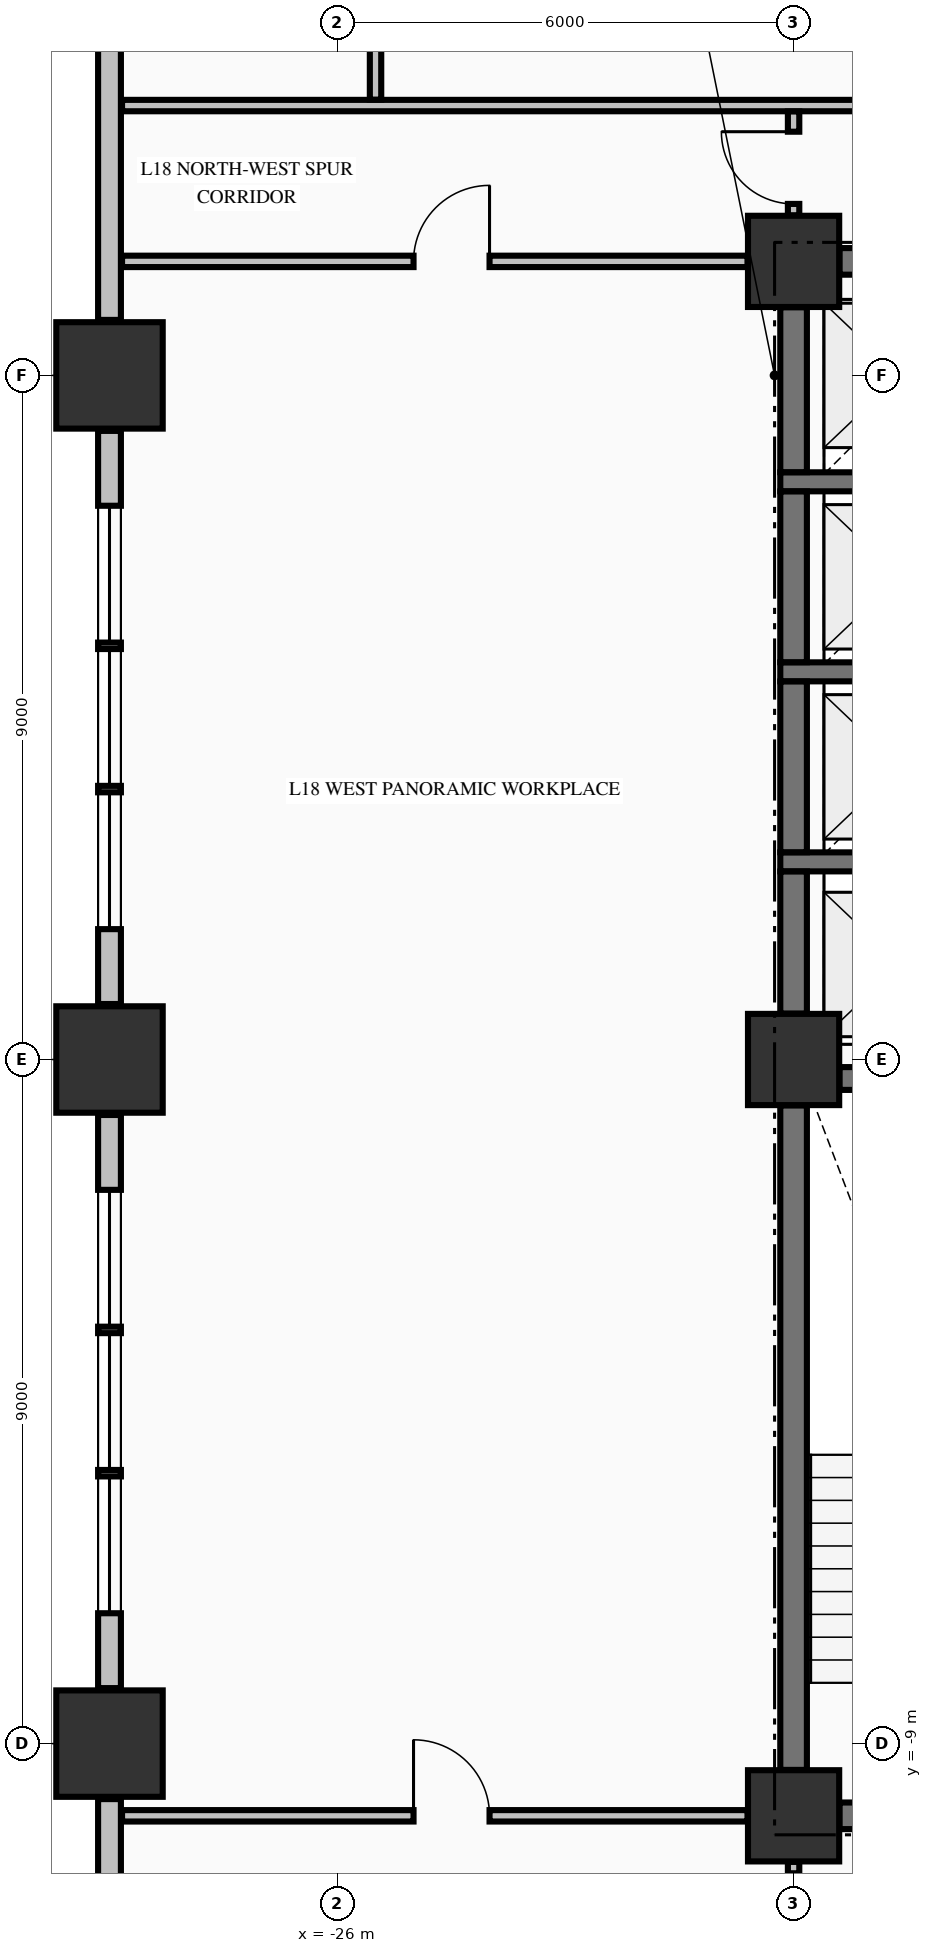
"""IFC4 building model, lengths in metres.
Left out: names, types, materials, properties, quantities, classifications, styles, units other than length and angle.
Written with IfcOpenShell. Run it as: python <this file> out.ifc"""

import sys

from ifc_helpers import new_model, si_unit, direction, frame, frame_2d, origin, origin_2d, place, context, subcontext, project, spatial, rectangle, extrude, element, fill, save


model = new_model("IFC4")
c1 = context("Model", 3, precision=1e-05, world=origin(), true_north=direction((0.0, 1.0)))
c2 = subcontext(c1, "Body", "Model", "MODEL_VIEW")
j1 = project(units=[si_unit("LENGTHUNIT", "METRE"), si_unit("PLANEANGLEUNIT", "RADIAN")], contexts=[c1])
p1 = place(None, origin())
s1 = spatial("IfcSite", under=j1, at=p1, CompositionType="ELEMENT")
p2 = place(p1, origin())
s2 = spatial("IfcBuilding", under=s1, at=p2, CompositionType="ELEMENT")
p3 = place(p2, frame((0.0, 0.0, 75.04)))
s3 = spatial("IfcBuildingStorey", under=s2, at=p3, CompositionType="ELEMENT", Elevation=75.04)
for number, where, z_axis, x_axis in (
    (1, (-29.0, -9.0, -0.25), (0.0, 0.0, 1.0), (1.0, 0.0, 0.0)),
    (2, (-29.0, 0.0, -0.25), (0.0, 0.0, 1.0), (1.0, 0.0, 0.0)),
    (3, (-29.0, 9.0, -0.25), (0.0, 0.0, 1.0), (1.0, 0.0, 0.0)),
):
    element("IfcColumn", number, at=place(p3, frame(where, z_axis=z_axis, x_axis=x_axis)), inside=s3, PredefinedType="COLUMN", context=c2, shape_type="SweptSolid", body=[
        extrude(rectangle(XDim=1.4, YDim=1.4, at=origin_2d()), origin(), (0.0, 0.0, 1.0), 3.57),
    ])
for number, where, z_axis, x_axis in (
    (4, (-20.0, -9.95, -0.25), (0.0, 0.0, 1.0), (1.0, 0.0, 0.0)),
    (5, (-20.0, 10.5, -0.25), (0.0, 0.0, 1.0), (1.0, 0.0, 0.0)),
    (6, (-20.0, 0.0, -0.25), (0.0, 0.0, 1.0), (1.0, 0.0, 0.0)),
):
    element("IfcColumn", number, at=place(p3, frame(where, z_axis=z_axis, x_axis=x_axis)), inside=s3, PredefinedType="COLUMN", context=c2, shape_type="SweptSolid", body=[
        extrude(rectangle(XDim=1.2, YDim=1.2, at=origin_2d()), origin(), (0.0, 0.0, 1.0), 3.57),
    ])
p4 = place(p3, frame((-29.0, -9.73, 0.0), z_axis=(0.0, 0.0, 1.0), x_axis=(0.0, -1.0, 0.0)))
e7 = element("IfcWall", 7, at=p4, inside=s3, PredefinedType="STANDARD", context=c2, shape_type="SweptSolid", body=[
    extrude(rectangle(XDim=12.54, YDim=0.3, at=frame_2d((6.27, 0.0))), origin(), (0.0, 0.0, 1.0), 2.712),
])
p5 = place(p3, frame((-29.0, -0.73, 0.0), z_axis=(0.0, 0.0, 1.0), x_axis=(0.0, -1.0, 0.0)))
e8 = element("IfcWall", 8, at=p5, inside=s3, PredefinedType="STANDARD", context=c2, shape_type="SweptSolid", body=[
    extrude(rectangle(XDim=7.54, YDim=0.3, at=frame_2d((3.77, 0.0))), origin(), (0.0, 0.0, 1.0), 2.712),
])
p6 = place(p5, frame((0.985, 0.0, 0.78)))
e9 = element("IfcOpeningElement", 9, at=p6, cuts=e8, PredefinedType="OPENING", context=c2, shape_type="SweptSolid", body=[
    extrude(rectangle(XDim=1.8, YDim=1.72, at=frame_2d((0.9, 0.86))), frame((0.0, 0.16, 0.0), z_axis=(0.0, -1.0, 0.0), x_axis=(1.0, 0.0, 0.0)), (0.0, 0.0, 1.0), 0.32),
])
p7 = place(p5, frame((2.87, 0.0, 0.78)))
e10 = element("IfcOpeningElement", 10, at=p7, cuts=e8, PredefinedType="OPENING", context=c2, shape_type="SweptSolid", body=[
    extrude(rectangle(XDim=1.8, YDim=1.72, at=frame_2d((0.9, 0.86))), frame((0.0, 0.16, 0.0), z_axis=(0.0, -1.0, 0.0), x_axis=(1.0, 0.0, 0.0)), (0.0, 0.0, 1.0), 0.32),
])
p8 = place(p5, frame((4.755, 0.0, 0.78)))
e11 = element("IfcOpeningElement", 11, at=p8, cuts=e8, PredefinedType="OPENING", context=c2, shape_type="SweptSolid", body=[
    extrude(rectangle(XDim=1.8, YDim=1.72, at=frame_2d((0.9, 0.86))), frame((0.0, 0.16, 0.0), z_axis=(0.0, -1.0, 0.0), x_axis=(1.0, 0.0, 0.0)), (0.0, 0.0, 1.0), 0.32),
])
p9 = place(p3, frame((-29.0, 8.27, 0.0), z_axis=(0.0, 0.0, 1.0), x_axis=(0.0, -1.0, 0.0)))
e12 = element("IfcWall", 12, at=p9, inside=s3, PredefinedType="STANDARD", context=c2, shape_type="SweptSolid", body=[
    extrude(rectangle(XDim=7.54, YDim=0.3, at=frame_2d((3.77, 0.0))), origin(), (0.0, 0.0, 1.0), 2.712),
])
p10 = place(p9, frame((0.985, 0.0, 0.78)))
e13 = element("IfcOpeningElement", 13, at=p10, cuts=e12, PredefinedType="OPENING", context=c2, shape_type="SweptSolid", body=[
    extrude(rectangle(XDim=1.8, YDim=1.72, at=frame_2d((0.9, 0.86))), frame((0.0, 0.16, 0.0), z_axis=(0.0, -1.0, 0.0), x_axis=(1.0, 0.0, 0.0)), (0.0, 0.0, 1.0), 0.32),
])
p11 = place(p9, frame((2.87, 0.0, 0.78)))
e14 = element("IfcOpeningElement", 14, at=p11, cuts=e12, PredefinedType="OPENING", context=c2, shape_type="SweptSolid", body=[
    extrude(rectangle(XDim=1.8, YDim=1.72, at=frame_2d((0.9, 0.86))), frame((0.0, 0.16, 0.0), z_axis=(0.0, -1.0, 0.0), x_axis=(1.0, 0.0, 0.0)), (0.0, 0.0, 1.0), 0.32),
])
p12 = place(p9, frame((4.755, 0.0, 0.78)))
e15 = element("IfcOpeningElement", 15, at=p12, cuts=e12, PredefinedType="OPENING", context=c2, shape_type="SweptSolid", body=[
    extrude(rectangle(XDim=1.8, YDim=1.72, at=frame_2d((0.9, 0.86))), frame((0.0, 0.16, 0.0), z_axis=(0.0, -1.0, 0.0), x_axis=(1.0, 0.0, 0.0)), (0.0, 0.0, 1.0), 0.32),
])
p13 = place(p3, frame((-29.0, 22.27, 0.0), z_axis=(0.0, 0.0, 1.0), x_axis=(0.0, -1.0, 0.0)))
e16 = element("IfcWall", 16, at=p13, inside=s3, PredefinedType="STANDARD", context=c2, shape_type="SweptSolid", body=[
    extrude(rectangle(XDim=12.54, YDim=0.3, at=frame_2d((6.27, 0.0))), origin(), (0.0, 0.0, 1.0), 2.712),
])
p14 = place(p3, frame((-19.396, -9.95, 0.0), z_axis=(0.0, 0.0, 1.0), x_axis=(1.0, 0.0, 0.0)))
e17 = element("IfcWall", 17, at=p14, inside=s3, PredefinedType="SHEAR", context=c2, shape_type="SweptSolid", body=[
    extrude(rectangle(XDim=4.696, YDim=0.35, at=frame_2d((2.348, 0.0))), origin(), (0.0, 0.0, 1.0), 3.32),
])
p15 = place(p14, frame((0.571, 0.0, 0.0)))
e18 = element("IfcOpeningElement", 18, at=p15, cuts=e17, PredefinedType="OPENING", context=c2, shape_type="SweptSolid", body=[
    extrude(rectangle(XDim=1.05, YDim=2.15, at=frame_2d((0.525, 1.075))), frame((0.0, 0.185, 0.0), z_axis=(0.0, -1.0, 0.0), x_axis=(1.0, 0.0, 0.0)), (0.0, 0.0, 1.0), 0.37),
])
p16 = place(p3, frame((-19.396, -0.25, 0.0), z_axis=(0.0, 0.0, 1.0), x_axis=(1.0, 0.0, 0.0)))
e19 = element("IfcWall", 19, at=p16, inside=s3, PredefinedType="SHEAR", context=c2, shape_type="SweptSolid", body=[
    extrude(rectangle(XDim=7.792, YDim=0.3, at=frame_2d((3.896, 0.0))), origin(), (0.0, 0.0, 1.0), 3.32),
])
p17 = place(p16, frame((5.696, 0.0, 0.0)))
e20 = element("IfcOpeningElement", 20, at=p17, cuts=e19, PredefinedType="OPENING", context=c2, shape_type="SweptSolid", body=[
    extrude(rectangle(XDim=1.1, YDim=2.15, at=frame_2d((0.55, 1.075))), frame((0.0, 0.16, 0.0), z_axis=(0.0, -1.0, 0.0), x_axis=(1.0, 0.0, 0.0)), (0.0, 0.0, 1.0), 0.32),
])
for number, where, z_axis, x_axis in (
    (21, (-20.175, 2.6, 0.0), (0.0, 0.0, 1.0), (1.0, 0.0, 0.0)),
    (22, (-20.175, 5.1, 0.0), (0.0, 0.0, 1.0), (1.0, 0.0, 0.0)),
    (23, (-20.175, 7.6, 0.0), (0.0, 0.0, 1.0), (1.0, 0.0, 0.0)),
):
    element("IfcWall", number, at=place(p3, frame(where, z_axis=z_axis, x_axis=x_axis)), inside=s3, PredefinedType="SOLIDWALL", context=c2, shape_type="SweptSolid", body=[
        extrude(rectangle(XDim=3.1, YDim=0.25, at=frame_2d((1.55, 0.0))), origin(), (0.0, 0.0, 1.0), 3.32),
    ])
p18 = place(p3, frame((-19.396, 10.5, 0.0), z_axis=(0.0, 0.0, 1.0), x_axis=(1.0, 0.0, 0.0)))
e24 = element("IfcWall", 24, at=p18, inside=s3, PredefinedType="SHEAR", context=c2, shape_type="SweptSolid", body=[
    extrude(rectangle(XDim=4.696, YDim=0.35, at=frame_2d((2.348, 0.0))), origin(), (0.0, 0.0, 1.0), 3.32),
])
p19 = place(p18, frame((2.796, 0.0, 0.0)))
e25 = element("IfcOpeningElement", 25, at=p19, cuts=e24, PredefinedType="OPENING", context=c2, shape_type="SweptSolid", body=[
    extrude(rectangle(XDim=1.2, YDim=2.15, at=frame_2d((0.6, 1.075))), frame((0.0, 0.185, 0.0), z_axis=(0.0, -1.0, 0.0), x_axis=(1.0, 0.0, 0.0)), (0.0, 0.0, 1.0), 0.37),
])
p20 = place(p3, frame((-28.835, -9.95, 0.0), z_axis=(0.0, 0.0, 1.0), x_axis=(1.0, 0.0, 0.0)))
e26 = element("IfcWall", 26, at=p20, inside=s3, PredefinedType="PARTITIONING", context=c2, shape_type="SweptSolid", body=[
    extrude(rectangle(XDim=8.229, YDim=0.15, at=frame_2d((4.115, 0.0))), origin(), (0.0, 0.0, 1.0), 3.32),
])
p21 = place(p20, frame((3.835, 0.0, 0.0)))
e27 = element("IfcOpeningElement", 27, at=p21, cuts=e26, PredefinedType="OPENING", context=c2, shape_type="SweptSolid", body=[
    extrude(rectangle(XDim=1.0, YDim=2.15, at=frame_2d((0.5, 1.075))), frame((0.0, 0.085, 0.0), z_axis=(0.0, -1.0, 0.0), x_axis=(1.0, 0.0, 0.0)), (0.0, 0.0, 1.0), 0.17),
])
p22 = place(p3, frame((-28.835, 10.5, 0.0), z_axis=(0.0, 0.0, 1.0), x_axis=(1.0, 0.0, 0.0)))
e28 = element("IfcWall", 28, at=p22, inside=s3, PredefinedType="PARTITIONING", context=c2, shape_type="SweptSolid", body=[
    extrude(rectangle(XDim=8.229, YDim=0.15, at=frame_2d((4.115, 0.0))), origin(), (0.0, 0.0, 1.0), 3.32),
])
p23 = place(p22, frame((3.835, 0.0, 0.0)))
e29 = element("IfcOpeningElement", 29, at=p23, cuts=e28, PredefinedType="OPENING", context=c2, shape_type="SweptSolid", body=[
    extrude(rectangle(XDim=1.0, YDim=2.15, at=frame_2d((0.5, 1.075))), frame((0.0, 0.085, 0.0), z_axis=(0.0, -1.0, 0.0), x_axis=(1.0, 0.0, 0.0)), (0.0, 0.0, 1.0), 0.17),
])
p24 = place(p3, frame((-28.835, 12.55, 0.0), z_axis=(0.0, 0.0, 1.0), x_axis=(1.0, 0.0, 0.0)))
e30 = element("IfcWall", 30, at=p24, inside=s3, PredefinedType="PARTITIONING", context=c2, shape_type="SweptSolid", body=[
    extrude(rectangle(XDim=52.67, YDim=0.15, at=frame_2d((26.335, 0.0))), origin(), (0.0, 0.0, 1.0), 3.32),
])
p25 = place(p24, frame((10.79, 0.0, 0.0)))
e31 = element("IfcOpeningElement", 31, at=p25, cuts=e30, PredefinedType="OPENING", context=c2, shape_type="SweptSolid", body=[
    extrude(rectangle(XDim=1.05, YDim=2.15, at=frame_2d((0.525, 1.075))), frame((0.0, 0.085, 0.0), z_axis=(0.0, -1.0, 0.0), x_axis=(1.0, 0.0, 0.0)), (0.0, 0.0, 1.0), 0.17),
])
p26 = place(p24, frame((18.46, 0.0, 0.0)))
e32 = element("IfcOpeningElement", 32, at=p26, cuts=e30, PredefinedType="OPENING", context=c2, shape_type="SweptSolid", body=[
    extrude(rectangle(XDim=0.95, YDim=2.15, at=frame_2d((0.475, 1.075))), frame((0.0, 0.085, 0.0), z_axis=(0.0, -1.0, 0.0), x_axis=(1.0, 0.0, 0.0)), (0.0, 0.0, 1.0), 0.17),
])
p27 = place(p24, frame((24.66, 0.0, 0.0)))
e33 = element("IfcOpeningElement", 33, at=p27, cuts=e30, PredefinedType="OPENING", context=c2, shape_type="SweptSolid", body=[
    extrude(rectangle(XDim=1.05, YDim=2.15, at=frame_2d((0.525, 1.075))), frame((0.0, 0.085, 0.0), z_axis=(0.0, -1.0, 0.0), x_axis=(1.0, 0.0, 0.0)), (0.0, 0.0, 1.0), 0.17),
])
p28 = place(p24, frame((32.71, 0.0, 0.0)))
e34 = element("IfcOpeningElement", 34, at=p28, cuts=e30, PredefinedType="OPENING", context=c2, shape_type="SweptSolid", body=[
    extrude(rectangle(XDim=0.95, YDim=2.15, at=frame_2d((0.475, 1.075))), frame((0.0, 0.085, 0.0), z_axis=(0.0, -1.0, 0.0), x_axis=(1.0, 0.0, 0.0)), (0.0, 0.0, 1.0), 0.17),
])
p29 = place(p24, frame((40.46, 0.0, 0.0)))
e35 = element("IfcOpeningElement", 35, at=p29, cuts=e30, PredefinedType="OPENING", context=c2, shape_type="SweptSolid", body=[
    extrude(rectangle(XDim=0.95, YDim=2.15, at=frame_2d((0.475, 1.075))), frame((0.0, 0.085, 0.0), z_axis=(0.0, -1.0, 0.0), x_axis=(1.0, 0.0, 0.0)), (0.0, 0.0, 1.0), 0.17),
])
p30 = place(p24, frame((45.13, 0.0, 0.0)))
e36 = element("IfcOpeningElement", 36, at=p30, cuts=e30, PredefinedType="OPENING", context=c2, shape_type="SweptSolid", body=[
    extrude(rectangle(XDim=0.95, YDim=2.15, at=frame_2d((0.475, 1.075))), frame((0.0, 0.085, 0.0), z_axis=(0.0, -1.0, 0.0), x_axis=(1.0, 0.0, 0.0)), (0.0, 0.0, 1.0), 0.17),
])
p31 = place(p3, frame((-20.0, -9.346, 0.0), z_axis=(0.0, 0.0, 1.0), x_axis=(0.0, 1.0, 0.0)))
e37 = element("IfcWall", 37, at=p31, inside=s3, PredefinedType="SHEAR", context=c2, shape_type="SweptSolid", body=[
    extrude(rectangle(XDim=8.742, YDim=0.35, at=frame_2d((4.371, 0.0))), origin(), (0.0, 0.0, 1.0), 3.32),
])
p32 = place(p3, frame((-20.0, 0.604, 0.0), z_axis=(0.0, 0.0, 1.0), x_axis=(0.0, 1.0, 0.0)))
e38 = element("IfcWall", 38, at=p32, inside=s3, PredefinedType="SHEAR", context=c2, shape_type="SweptSolid", body=[
    extrude(rectangle(XDim=1.869, YDim=0.35, at=frame_2d((0.935, 0.0))), origin(), (0.0, 0.0, 1.0), 3.32),
])
for number, where, z_axis, x_axis in (
    (39, (-20.0, 2.727, 0.0), (0.0, 0.0, 1.0), (0.0, 1.0, 0.0)),
    (40, (-20.0, 5.227, 0.0), (0.0, 0.0, 1.0), (0.0, 1.0, 0.0)),
):
    element("IfcWall", number, at=place(p3, frame(where, z_axis=z_axis, x_axis=x_axis)), inside=s3, PredefinedType="SHEAR", context=c2, shape_type="SweptSolid", body=[
        extrude(rectangle(XDim=2.246, YDim=0.35, at=frame_2d((1.123, 0.0))), origin(), (0.0, 0.0, 1.0), 3.32),
    ])
p33 = place(p3, frame((-20.0, 7.727, 0.0), z_axis=(0.0, 0.0, 1.0), x_axis=(0.0, 1.0, 0.0)))
e41 = element("IfcWall", 41, at=p33, inside=s3, PredefinedType="SHEAR", context=c2, shape_type="SweptSolid", body=[
    extrude(rectangle(XDim=2.169, YDim=0.35, at=frame_2d((1.084, 0.0))), origin(), (0.0, 0.0, 1.0), 3.32),
])
p34 = place(p3, frame((-25.5, 12.628, 0.0), z_axis=(0.0, 0.0, 1.0), x_axis=(0.0, 1.0, 0.0)))
e42 = element("IfcWall", 42, at=p34, inside=s3, PredefinedType="PARTITIONING", context=c2, shape_type="SweptSolid", body=[
    extrude(rectangle(XDim=9.666, YDim=0.15, at=frame_2d((4.833, 0.0))), origin(), (0.0, 0.0, 1.0), 3.32),
])
p35 = place(p3, frame((-20.0, -12.122, 0.0), z_axis=(0.0, 0.0, 1.0), x_axis=(0.0, 1.0, 0.0)))
e43 = element("IfcWall", 43, at=p35, inside=s3, PredefinedType="PARTITIONING", context=c2, shape_type="SweptSolid", body=[
    extrude(rectangle(XDim=1.566, YDim=0.15, at=frame_2d((0.783, 0.0))), origin(), (0.0, 0.0, 1.0), 2.66),
])
p36 = place(p35, frame((0.466, 0.0, 0.0)))
e44 = element("IfcOpeningElement", 44, at=p36, cuts=e43, PredefinedType="OPENING", context=c2, shape_type="SweptSolid", body=[
    extrude(rectangle(XDim=0.95, YDim=2.15, at=frame_2d((0.475, 1.075))), frame((0.0, 0.085, 0.0), z_axis=(0.0, -1.0, 0.0), x_axis=(1.0, 0.0, 0.0)), (0.0, 0.0, 1.0), 0.17),
])
p37 = place(p3, frame((-20.0, 11.106, 0.0), z_axis=(0.0, 0.0, 1.0), x_axis=(0.0, 1.0, 0.0)))
e45 = element("IfcWall", 45, at=p37, inside=s3, PredefinedType="PARTITIONING", context=c2, shape_type="SweptSolid", body=[
    extrude(rectangle(XDim=1.366, YDim=0.15, at=frame_2d((0.683, 0.0))), origin(), (0.0, 0.0, 1.0), 2.66),
])
p38 = place(p37, frame((0.15, 0.0, 0.0)))
e46 = element("IfcOpeningElement", 46, at=p38, cuts=e45, PredefinedType="OPENING", context=c2, shape_type="SweptSolid", body=[
    extrude(rectangle(XDim=0.95, YDim=2.15, at=frame_2d((0.475, 1.075))), frame((0.0, 0.085, 0.0), z_axis=(0.0, -1.0, 0.0), x_axis=(1.0, 0.0, 0.0)), (0.0, 0.0, 1.0), 0.17),
])
p39 = place(p6, origin())
e47 = element("IfcWindow", 47, at=p39, inside=s3, PartitioningType="SINGLE_PANEL", PredefinedType="WINDOW", context=c2, shape_type="SweptSolid", body=[
    extrude(rectangle(XDim=1.8, YDim=1.72, at=frame_2d((0.9, 0.86))), frame((0.0, 0.03, 0.0), z_axis=(0.0, -1.0, 0.0), x_axis=(1.0, 0.0, 0.0)), (0.0, 0.0, 1.0), 0.06),
])
fill(e9, e47)
p40 = place(p7, origin())
e48 = element("IfcWindow", 48, at=p40, inside=s3, PartitioningType="SINGLE_PANEL", PredefinedType="WINDOW", context=c2, shape_type="SweptSolid", body=[
    extrude(rectangle(XDim=1.8, YDim=1.72, at=frame_2d((0.9, 0.86))), frame((0.0, 0.03, 0.0), z_axis=(0.0, -1.0, 0.0), x_axis=(1.0, 0.0, 0.0)), (0.0, 0.0, 1.0), 0.06),
])
fill(e10, e48)
p41 = place(p8, origin())
e49 = element("IfcWindow", 49, at=p41, inside=s3, PartitioningType="SINGLE_PANEL", PredefinedType="WINDOW", context=c2, shape_type="SweptSolid", body=[
    extrude(rectangle(XDim=1.8, YDim=1.72, at=frame_2d((0.9, 0.86))), frame((0.0, 0.03, 0.0), z_axis=(0.0, -1.0, 0.0), x_axis=(1.0, 0.0, 0.0)), (0.0, 0.0, 1.0), 0.06),
])
fill(e11, e49)
p42 = place(p10, origin())
e50 = element("IfcWindow", 50, at=p42, inside=s3, PartitioningType="SINGLE_PANEL", PredefinedType="WINDOW", context=c2, shape_type="SweptSolid", body=[
    extrude(rectangle(XDim=1.8, YDim=1.72, at=frame_2d((0.9, 0.86))), frame((0.0, 0.03, 0.0), z_axis=(0.0, -1.0, 0.0), x_axis=(1.0, 0.0, 0.0)), (0.0, 0.0, 1.0), 0.06),
])
fill(e13, e50)
p43 = place(p11, origin())
e51 = element("IfcWindow", 51, at=p43, inside=s3, PartitioningType="SINGLE_PANEL", PredefinedType="WINDOW", context=c2, shape_type="SweptSolid", body=[
    extrude(rectangle(XDim=1.8, YDim=1.72, at=frame_2d((0.9, 0.86))), frame((0.0, 0.03, 0.0), z_axis=(0.0, -1.0, 0.0), x_axis=(1.0, 0.0, 0.0)), (0.0, 0.0, 1.0), 0.06),
])
fill(e14, e51)
p44 = place(p12, origin())
e52 = element("IfcWindow", 52, at=p44, inside=s3, PartitioningType="SINGLE_PANEL", PredefinedType="WINDOW", context=c2, shape_type="SweptSolid", body=[
    extrude(rectangle(XDim=1.8, YDim=1.72, at=frame_2d((0.9, 0.86))), frame((0.0, 0.03, 0.0), z_axis=(0.0, -1.0, 0.0), x_axis=(1.0, 0.0, 0.0)), (0.0, 0.0, 1.0), 0.06),
])
fill(e15, e52)
p45 = place(p38, origin())
e53 = element("IfcDoor", 53, at=p45, inside=s3, OperationType="SINGLE_SWING_RIGHT", PredefinedType="DOOR", context=c2, shape_type="SweptSolid", body=[
    extrude(rectangle(XDim=0.95, YDim=2.15, at=frame_2d((0.475, 1.075))), frame((0.0, 0.025, 0.0), z_axis=(0.0, -1.0, 0.0), x_axis=(1.0, 0.0, 0.0)), (0.0, 0.0, 1.0), 0.05),
])
fill(e46, e53)
p46 = place(p36, origin())
e54 = element("IfcDoor", 54, at=p46, inside=s3, OperationType="SINGLE_SWING_LEFT", PredefinedType="DOOR", context=c2, shape_type="SweptSolid", body=[
    extrude(rectangle(XDim=0.95, YDim=2.15, at=frame_2d((0.475, 1.075))), frame((0.0, 0.025, 0.0), z_axis=(0.0, -1.0, 0.0), x_axis=(1.0, 0.0, 0.0)), (0.0, 0.0, 1.0), 0.05),
])
fill(e44, e54)
p47 = place(p23, origin())
e55 = element("IfcDoor", 55, at=p47, inside=s3, OperationType="SINGLE_SWING_RIGHT", PredefinedType="DOOR", context=c2, shape_type="SweptSolid", body=[
    extrude(rectangle(XDim=1.0, YDim=2.15, at=frame_2d((0.5, 1.075))), frame((0.0, 0.025, 0.0), z_axis=(0.0, -1.0, 0.0), x_axis=(1.0, 0.0, 0.0)), (0.0, 0.0, 1.0), 0.05),
])
fill(e29, e55)
p48 = place(p21, origin())
e56 = element("IfcDoor", 56, at=p48, inside=s3, OperationType="SINGLE_SWING_LEFT", PredefinedType="DOOR", context=c2, shape_type="SweptSolid", body=[
    extrude(rectangle(XDim=1.0, YDim=2.15, at=frame_2d((0.5, 1.075))), frame((0.0, 0.025, 0.0), z_axis=(0.0, -1.0, 0.0), x_axis=(1.0, 0.0, 0.0)), (0.0, 0.0, 1.0), 0.05),
])
fill(e27, e56)
save(model, sys.argv[1])
